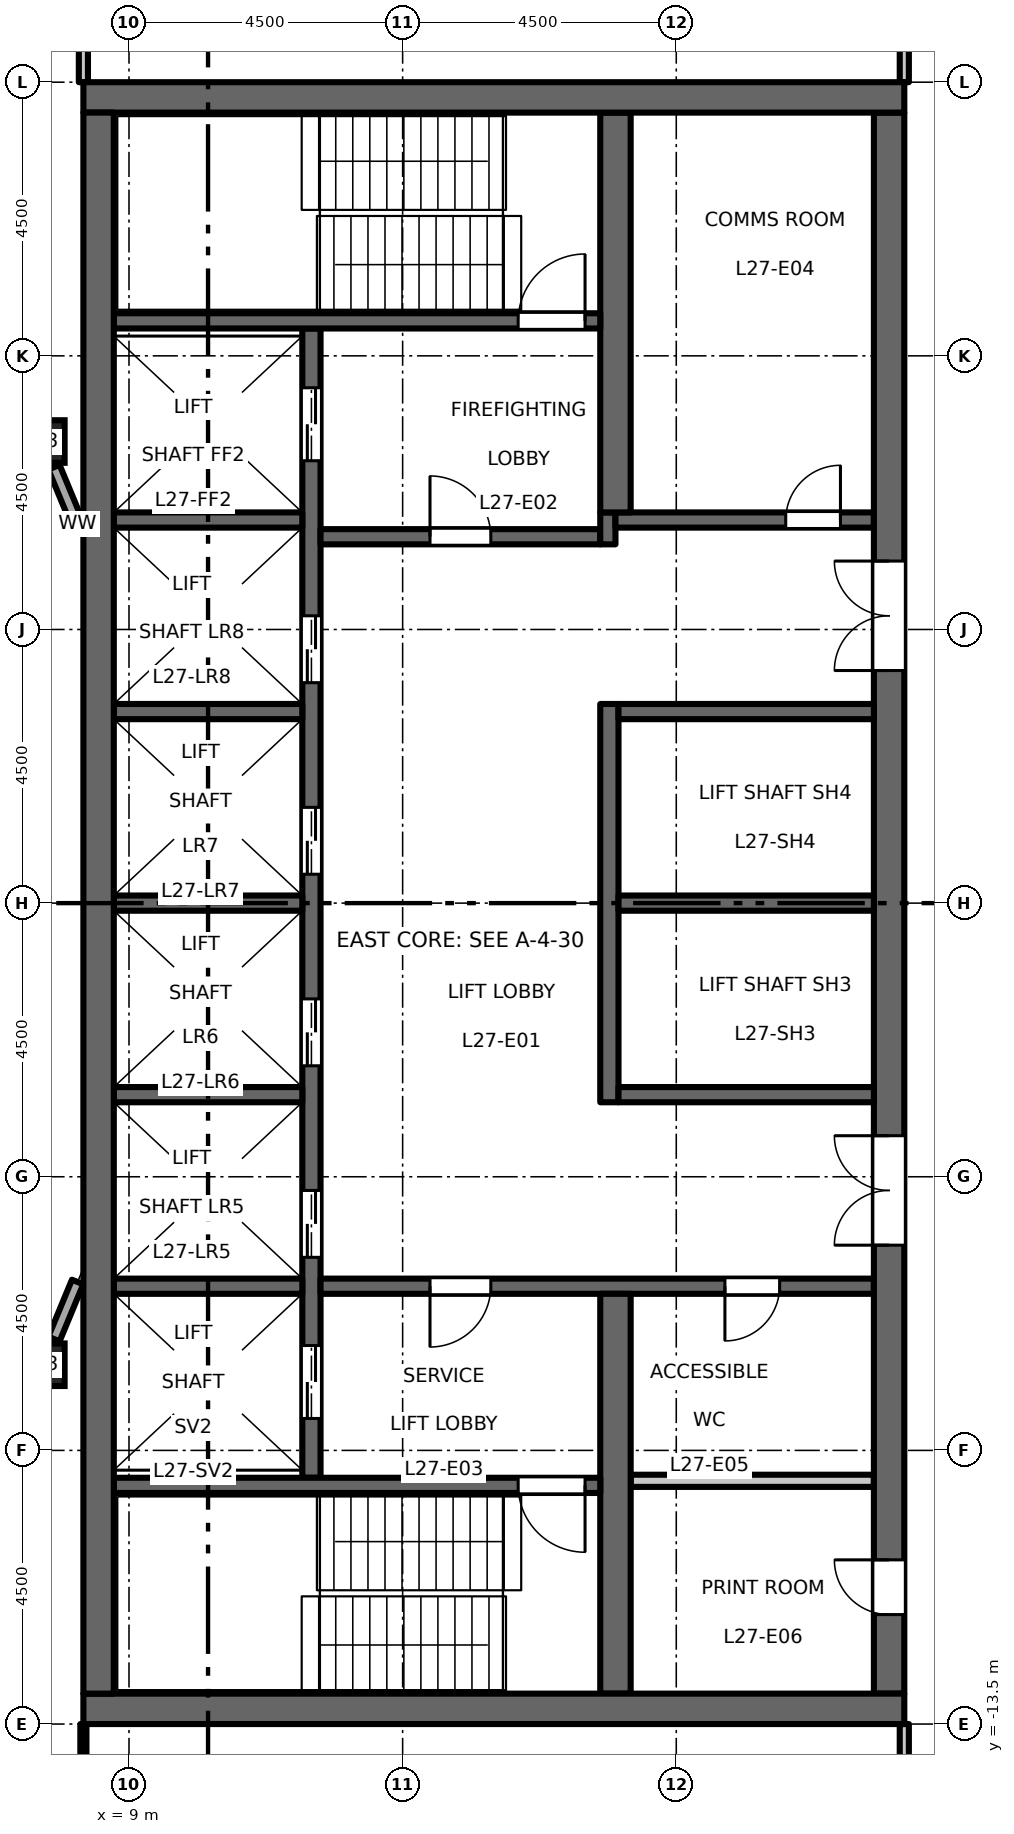
"""IFC4 building model, lengths in metres.
Left out: names, types, materials, properties, quantities, classifications, styles, units other than length and angle.
Written with IfcOpenShell. Run it as: python <this file> out.ifc"""

import sys

from ifc_helpers import new_model, si_unit, direction, frame, frame_2d, origin, origin_2d, place, context, subcontext, project, spatial, rectangle, hollow_rectangle, extrude, element, fill, save


model = new_model("IFC4")
c1 = context("Model", 3, precision=1e-05, world=origin(), true_north=direction((0.0, 1.0)))
c2 = subcontext(c1, "Body", "Model", "MODEL_VIEW")
j1 = project(units=[si_unit("LENGTHUNIT", "METRE"), si_unit("PLANEANGLEUNIT", "RADIAN")], contexts=[c1])
p1 = place(None, origin())
s1 = spatial("IfcSite", under=j1, at=p1, CompositionType="ELEMENT")
p2 = place(p1, origin())
s2 = spatial("IfcBuilding", under=s1, at=p2, CompositionType="ELEMENT")
p3 = place(p2, frame((0.0, 0.0, 127.2)))
s3 = spatial("IfcBuildingStorey", under=s2, at=p3, CompositionType="ELEMENT", Elevation=127.2)
for number, where, z_axis, x_axis in (
    (1, (7.591, -7.591, 0.0), (0.0, 0.0, 1.0), (1.0, 0.0, 0.0)),
    (2, (7.591, 7.591, 0.0), (0.0, 0.0, 1.0), (1.0, 0.0, 0.0)),
):
    element("IfcColumn", number, at=place(p3, frame(where, z_axis=z_axis, x_axis=x_axis)), inside=s3, PredefinedType="COLUMN", context=c2, shape_type="SweptSolid", body=[
        extrude(hollow_rectangle(XDim=0.7, YDim=0.7, WallThickness=0.04, at=origin_2d()), origin(), (0.0, 0.0, 1.0), 4.5),
    ])
p4 = place(p3, frame((12.0, -9.45, 0.0), z_axis=(0.0, 0.0, 1.0), x_axis=(0.0, 1.0, 0.0)))
e3 = element("IfcWall", 3, at=p4, inside=s3, PredefinedType="SHEAR", context=c2, shape_type="SweptSolid", body=[
    extrude(rectangle(XDim=18.9, YDim=0.3, at=frame_2d((9.45, 0.0))), origin(), (0.0, 0.0, 1.0), 4.35),
])
p5 = place(p4, frame((3.625, 0.0, 0.0)))
e4 = element("IfcOpeningElement", 4, at=p5, cuts=e3, PredefinedType="OPENING", context=c2, shape_type="SweptSolid", body=[
    extrude(rectangle(XDim=1.1, YDim=2.1, at=frame_2d((0.55, 1.05))), frame((0.0, 0.16, 0.0), z_axis=(0.0, -1.0, 0.0), x_axis=(1.0, 0.0, 0.0)), (0.0, 0.0, 1.0), 0.32),
])
p6 = place(p4, frame((6.775, 0.0, 0.0)))
e5 = element("IfcOpeningElement", 5, at=p6, cuts=e3, PredefinedType="OPENING", context=c2, shape_type="SweptSolid", body=[
    extrude(rectangle(XDim=1.1, YDim=2.1, at=frame_2d((0.55, 1.05))), frame((0.0, 0.16, 0.0), z_axis=(0.0, -1.0, 0.0), x_axis=(1.0, 0.0, 0.0)), (0.0, 0.0, 1.0), 0.32),
])
p7 = place(p4, frame((9.925, 0.0, 0.0)))
e6 = element("IfcOpeningElement", 6, at=p7, cuts=e3, PredefinedType="OPENING", context=c2, shape_type="SweptSolid", body=[
    extrude(rectangle(XDim=1.1, YDim=2.1, at=frame_2d((0.55, 1.05))), frame((0.0, 0.16, 0.0), z_axis=(0.0, -1.0, 0.0), x_axis=(1.0, 0.0, 0.0)), (0.0, 0.0, 1.0), 0.32),
])
p8 = place(p4, frame((13.075, 0.0, 0.0)))
e7 = element("IfcOpeningElement", 7, at=p8, cuts=e3, PredefinedType="OPENING", context=c2, shape_type="SweptSolid", body=[
    extrude(rectangle(XDim=1.1, YDim=2.1, at=frame_2d((0.55, 1.05))), frame((0.0, 0.16, 0.0), z_axis=(0.0, -1.0, 0.0), x_axis=(1.0, 0.0, 0.0)), (0.0, 0.0, 1.0), 0.32),
])
p9 = place(p4, frame((16.725, 0.0, 0.0)))
e8 = element("IfcOpeningElement", 8, at=p9, cuts=e3, PredefinedType="OPENING", context=c2, shape_type="SweptSolid", body=[
    extrude(rectangle(XDim=1.2, YDim=2.1, at=frame_2d((0.6, 1.05))), frame((0.0, 0.16, 0.0), z_axis=(0.0, -1.0, 0.0), x_axis=(1.0, 0.0, 0.0)), (0.0, 0.0, 1.0), 0.32),
])
p10 = place(p4, frame((0.975, 0.0, 0.0)))
e9 = element("IfcOpeningElement", 9, at=p10, cuts=e3, PredefinedType="OPENING", context=c2, shape_type="SweptSolid", body=[
    extrude(rectangle(XDim=1.2, YDim=2.1, at=frame_2d((0.6, 1.05))), frame((0.0, 0.16, 0.0), z_axis=(0.0, -1.0, 0.0), x_axis=(1.0, 0.0, 0.0)), (0.0, 0.0, 1.0), 0.32),
])
p11 = place(p3, frame((12.15, 6.025, 0.0), z_axis=(0.0, 0.0, 1.0), x_axis=(1.0, 0.0, 0.0)))
e10 = element("IfcWall", 10, at=p11, inside=s3, PredefinedType="SHEAR", context=c2, shape_type="SweptSolid", body=[
    extrude(rectangle(XDim=4.6, YDim=0.25, at=frame_2d((2.3, 0.0))), origin(), (0.0, 0.0, 1.0), 4.35),
])
p12 = place(p11, frame((1.8, 0.0, 0.0)))
e11 = element("IfcOpeningElement", 11, at=p12, cuts=e10, PredefinedType="OPENING", context=c2, shape_type="SweptSolid", body=[
    extrude(rectangle(XDim=1.0, YDim=2.1, at=frame_2d((0.5, 1.05))), frame((0.0, 0.135, 0.0), z_axis=(0.0, -1.0, 0.0), x_axis=(1.0, 0.0, 0.0)), (0.0, 0.0, 1.0), 0.27),
])
p13 = place(p3, frame((16.875, 5.9, 0.0), z_axis=(0.0, 0.0, 1.0), x_axis=(0.0, 1.0, 0.0)))
e12 = element("IfcWall", 12, at=p13, inside=s3, PredefinedType="SHEAR", context=c2, shape_type="SweptSolid", body=[
    extrude(rectangle(XDim=0.525, YDim=0.25, at=frame_2d((0.263, 0.0))), origin(), (0.0, 0.0, 1.0), 4.35),
])
p14 = place(p3, frame((17.0, 6.3, 0.0), z_axis=(0.0, 0.0, 1.0), x_axis=(1.0, 0.0, 0.0)))
e13 = element("IfcWall", 13, at=p14, inside=s3, PredefinedType="SHEAR", context=c2, shape_type="SweptSolid", body=[
    extrude(rectangle(XDim=4.25, YDim=0.25, at=frame_2d((2.125, 0.0))), origin(), (0.0, 0.0, 1.0), 4.35),
])
p15 = place(p14, frame((2.8, 0.0, 0.0)))
e14 = element("IfcOpeningElement", 14, at=p15, cuts=e13, PredefinedType="OPENING", context=c2, shape_type="SweptSolid", body=[
    extrude(rectangle(XDim=0.9, YDim=2.1, at=frame_2d((0.45, 1.05))), frame((0.0, 0.135, 0.0), z_axis=(0.0, -1.0, 0.0), x_axis=(1.0, 0.0, 0.0)), (0.0, 0.0, 1.0), 0.27),
])
p16 = place(p3, frame((12.15, -6.3, 0.0), z_axis=(0.0, 0.0, 1.0), x_axis=(1.0, 0.0, 0.0)))
e15 = element("IfcWall", 15, at=p16, inside=s3, PredefinedType="SHEAR", context=c2, shape_type="SweptSolid", body=[
    extrude(rectangle(XDim=9.1, YDim=0.25, at=frame_2d((4.55, 0.0))), origin(), (0.0, 0.0, 1.0), 4.35),
])
p17 = place(p16, frame((1.8, 0.0, 0.0)))
e16 = element("IfcOpeningElement", 16, at=p17, cuts=e15, PredefinedType="OPENING", context=c2, shape_type="SweptSolid", body=[
    extrude(rectangle(XDim=1.0, YDim=2.1, at=frame_2d((0.5, 1.05))), frame((0.0, 0.135, 0.0), z_axis=(0.0, -1.0, 0.0), x_axis=(1.0, 0.0, 0.0)), (0.0, 0.0, 1.0), 0.27),
])
p18 = place(p16, frame((6.65, 0.0, 0.0)))
e17 = element("IfcOpeningElement", 17, at=p18, cuts=e15, PredefinedType="OPENING", context=c2, shape_type="SweptSolid", body=[
    extrude(rectangle(XDim=0.9, YDim=2.1, at=frame_2d((0.45, 1.05))), frame((0.0, 0.135, 0.0), z_axis=(0.0, -1.0, 0.0), x_axis=(1.0, 0.0, 0.0)), (0.0, 0.0, 1.0), 0.27),
])
p19 = place(p3, frame((21.5, -13.0, 0.0), z_axis=(0.0, 0.0, 1.0), x_axis=(0.0, 1.0, 0.0)))
e18 = element("IfcWall", 18, at=p19, inside=s3, PredefinedType="SHEAR", context=c2, shape_type="SweptSolid", body=[
    extrude(rectangle(XDim=26.0, YDim=0.5, at=frame_2d((13.0, 0.0))), origin(), (0.0, 0.0, 1.0), 4.35),
])
p20 = place(p19, frame((16.825, 0.0, 0.0)))
e19 = element("IfcOpeningElement", 19, at=p20, cuts=e18, PredefinedType="OPENING", context=c2, shape_type="SweptSolid", body=[
    extrude(rectangle(XDim=1.8, YDim=2.1, at=frame_2d((0.9, 1.05))), frame((0.0, 0.26, 0.0), z_axis=(0.0, -1.0, 0.0), x_axis=(1.0, 0.0, 0.0)), (0.0, 0.0, 1.0), 0.52),
])
p21 = place(p19, frame((7.375, 0.0, 0.0)))
e20 = element("IfcOpeningElement", 20, at=p21, cuts=e18, PredefinedType="OPENING", context=c2, shape_type="SweptSolid", body=[
    extrude(rectangle(XDim=1.8, YDim=2.1, at=frame_2d((0.9, 1.05))), frame((0.0, 0.26, 0.0), z_axis=(0.0, -1.0, 0.0), x_axis=(1.0, 0.0, 0.0)), (0.0, 0.0, 1.0), 0.52),
])
p22 = place(p19, frame((1.3, 0.0, 0.0)))
e21 = element("IfcOpeningElement", 21, at=p22, cuts=e18, PredefinedType="OPENING", context=c2, shape_type="SweptSolid", body=[
    extrude(rectangle(XDim=0.9, YDim=2.1, at=frame_2d((0.45, 1.05))), frame((0.0, 0.26, 0.0), z_axis=(0.0, -1.0, 0.0), x_axis=(1.0, 0.0, 0.0)), (0.0, 0.0, 1.0), 0.52),
])
p23 = place(p3, frame((17.25, -9.5, 0.0), z_axis=(0.0, 0.0, 1.0), x_axis=(1.0, 0.0, 0.0)))
e22 = element("IfcWall", 22, at=p23, inside=s3, PredefinedType="PARTITIONING", context=c2, shape_type="SweptSolid", body=[
    extrude(rectangle(XDim=4.0, YDim=0.2, at=frame_2d((2.0, 0.0))), origin(), (0.0, 0.0, 1.0), 4.35),
])
p24 = place(p3, frame((16.9, -3.275, 0.0), z_axis=(0.0, 0.0, 1.0), x_axis=(0.0, 1.0, 0.0)))
e23 = element("IfcWall", 23, at=p24, inside=s3, PredefinedType="SHEAR", context=c2, shape_type="SweptSolid", body=[
    extrude(rectangle(XDim=6.55, YDim=0.3, at=frame_2d((3.275, 0.0))), origin(), (0.0, 0.0, 1.0), 4.35),
])
for number, where, z_axis, x_axis in (
    (24, (17.05, 0.0, 0.0), (0.0, 0.0, 1.0), (1.0, 0.0, 0.0)),
    (25, (17.05, 3.15, 0.0), (0.0, 0.0, 1.0), (1.0, 0.0, 0.0)),
    (26, (17.05, -3.15, 0.0), (0.0, 0.0, 1.0), (1.0, 0.0, 0.0)),
):
    element("IfcWall", number, at=place(p3, frame(where, z_axis=z_axis, x_axis=x_axis)), inside=s3, PredefinedType="SHEAR", context=c2, shape_type="SweptSolid", body=[
        extrude(rectangle(XDim=4.2, YDim=0.25, at=frame_2d((2.1, 0.0))), origin(), (0.0, 0.0, 1.0), 4.35),
    ])
for number, where, z_axis, x_axis in (
    (27, (17.0, 6.425, 0.0), (0.0, 0.0, 1.0), (0.0, 1.0, 0.0)),
    (28, (17.0, -13.0, 0.0), (0.0, 0.0, 1.0), (0.0, 1.0, 0.0)),
):
    element("IfcWall", number, at=place(p3, frame(where, z_axis=z_axis, x_axis=x_axis)), inside=s3, PredefinedType="SHEAR", context=c2, shape_type="SweptSolid", body=[
        extrude(rectangle(XDim=6.575, YDim=0.5, at=frame_2d((3.288, 0.0))), origin(), (0.0, 0.0, 1.0), 4.35),
    ])
for number, where, z_axis, x_axis in (
    (29, (8.75, 0.0, 0.0), (0.0, 0.0, 1.0), (1.0, 0.0, 0.0)),
    (30, (8.75, 3.15, 0.0), (0.0, 0.0, 1.0), (1.0, 0.0, 0.0)),
    (31, (8.75, 6.3, 0.0), (0.0, 0.0, 1.0), (1.0, 0.0, 0.0)),
    (32, (8.75, -3.15, 0.0), (0.0, 0.0, 1.0), (1.0, 0.0, 0.0)),
    (33, (8.75, -6.3, 0.0), (0.0, 0.0, 1.0), (1.0, 0.0, 0.0)),
):
    element("IfcWall", number, at=place(p3, frame(where, z_axis=z_axis, x_axis=x_axis)), inside=s3, PredefinedType="SHEAR", context=c2, shape_type="SweptSolid", body=[
        extrude(rectangle(XDim=3.1, YDim=0.25, at=frame_2d((1.55, 0.0))), origin(), (0.0, 0.0, 1.0), 4.35),
    ])
p25 = place(p3, frame((8.75, 9.575, 0.0), z_axis=(0.0, 0.0, 1.0), x_axis=(1.0, 0.0, 0.0)))
e34 = element("IfcWall", 34, at=p25, inside=s3, PredefinedType="SHEAR", context=c2, shape_type="SweptSolid", body=[
    extrude(rectangle(XDim=8.0, YDim=0.25, at=frame_2d((4.0, 0.0))), origin(), (0.0, 0.0, 1.0), 4.35),
])
p26 = place(p25, frame((6.65, 0.0, 0.0)))
e35 = element("IfcOpeningElement", 35, at=p26, cuts=e34, PredefinedType="OPENING", context=c2, shape_type="SweptSolid", body=[
    extrude(rectangle(XDim=1.1, YDim=2.1, at=frame_2d((0.55, 1.05))), frame((0.0, 0.135, 0.0), z_axis=(0.0, -1.0, 0.0), x_axis=(1.0, 0.0, 0.0)), (0.0, 0.0, 1.0), 0.27),
])
p27 = place(p3, frame((8.75, -9.575, 0.0), z_axis=(0.0, 0.0, 1.0), x_axis=(1.0, 0.0, 0.0)))
e36 = element("IfcWall", 36, at=p27, inside=s3, PredefinedType="SHEAR", context=c2, shape_type="SweptSolid", body=[
    extrude(rectangle(XDim=8.0, YDim=0.25, at=frame_2d((4.0, 0.0))), origin(), (0.0, 0.0, 1.0), 4.35),
])
p28 = place(p27, frame((6.65, 0.0, 0.0)))
e37 = element("IfcOpeningElement", 37, at=p28, cuts=e36, PredefinedType="OPENING", context=c2, shape_type="SweptSolid", body=[
    extrude(rectangle(XDim=1.1, YDim=2.1, at=frame_2d((0.55, 1.05))), frame((0.0, 0.135, 0.0), z_axis=(0.0, -1.0, 0.0), x_axis=(1.0, 0.0, 0.0)), (0.0, 0.0, 1.0), 0.27),
])
for number, where, z_axis, x_axis in (
    (38, (8.25, 13.25, 0.0), (0.0, 0.0, 1.0), (1.0, 0.0, 0.0)),
    (39, (8.25, -13.25, 0.0), (0.0, 0.0, 1.0), (1.0, 0.0, 0.0)),
):
    element("IfcWall", number, at=place(p3, frame(where, z_axis=z_axis, x_axis=x_axis)), inside=s3, PredefinedType="SHEAR", context=c2, shape_type="SweptSolid", body=[
        extrude(rectangle(XDim=13.5, YDim=0.5, at=frame_2d((6.75, 0.0))), origin(), (0.0, 0.0, 1.0), 4.35),
    ])
p29 = place(p3, frame((8.5, -13.0, 0.0), z_axis=(0.0, 0.0, 1.0), x_axis=(0.0, 1.0, 0.0)))
e40 = element("IfcWall", 40, at=p29, inside=s3, PredefinedType="SHEAR", context=c2, shape_type="SweptSolid", body=[
    extrude(rectangle(XDim=26.0, YDim=0.5, at=frame_2d((13.0, 0.0))), origin(), (0.0, 0.0, 1.0), 4.35),
])
for number, where, z_axis, x_axis in (
    (41, (7.766, -7.168, 0.0), (0.0, 0.0, 1.0), (0.383, 0.924, 0.0)),
    (42, (8.154, 6.231, 0.0), (0.0, 0.0, 1.0), (-0.383, 0.924, 0.0)),
):
    element("IfcWall", number, at=place(p3, frame(where, z_axis=z_axis, x_axis=x_axis)), inside=s3, PredefinedType="STANDARD", context=c2, shape_type="SweptSolid", body=[
        extrude(rectangle(XDim=1.015, YDim=0.2, at=frame_2d((0.507, 0.0))), origin(), (0.0, 0.0, 1.0), 3.826),
    ])
p30 = place(p3, frame((8.25, -17.925, 0.0), z_axis=(0.0, 0.0, 1.0), x_axis=(0.0, 1.0, 0.0)))
e43 = element("IfcWall", 43, at=p30, inside=s3, PredefinedType="PARTITIONING", context=c2, shape_type="SweptSolid", body=[
    extrude(rectangle(XDim=4.425, YDim=0.1, at=frame_2d((2.212, 0.0))), origin(), (0.0, 0.0, 1.0), 4.35),
])
p31 = place(p3, frame((8.25, 13.5, 0.0), z_axis=(0.0, 0.0, 1.0), x_axis=(0.0, 1.0, 0.0)))
e44 = element("IfcWall", 44, at=p31, inside=s3, PredefinedType="PARTITIONING", context=c2, shape_type="SweptSolid", body=[
    extrude(rectangle(XDim=2.3, YDim=0.15, at=frame_2d((1.15, 0.0))), origin(), (0.0, 0.0, 1.0), 4.35),
])
for number, where, z_axis, x_axis in (
    (45, (21.75, -17.925, 0.0), (0.0, 0.0, 1.0), (0.0, 1.0, 0.0)),
    (46, (21.75, 13.5, 0.0), (0.0, 0.0, 1.0), (0.0, 1.0, 0.0)),
):
    element("IfcWall", number, at=place(p3, frame(where, z_axis=z_axis, x_axis=x_axis)), inside=s3, PredefinedType="PARTITIONING", context=c2, shape_type="SweptSolid", body=[
        extrude(rectangle(XDim=4.425, YDim=0.15, at=frame_2d((2.212, 0.0))), origin(), (0.0, 0.0, 1.0), 4.35),
    ])
p32 = place(p12, origin())
e47 = element("IfcDoor", 47, at=p32, inside=s3, OperationType="SINGLE_SWING_RIGHT", PredefinedType="DOOR", context=c2, shape_type="SweptSolid", body=[
    extrude(rectangle(XDim=1.0, YDim=2.1, at=frame_2d((0.5, 1.05))), frame((0.0, 0.025, 0.0), z_axis=(0.0, -1.0, 0.0), x_axis=(1.0, 0.0, 0.0)), (0.0, 0.0, 1.0), 0.05),
])
fill(e11, e47)
p33 = place(p17, origin())
e48 = element("IfcDoor", 48, at=p33, inside=s3, OperationType="SINGLE_SWING_LEFT", PredefinedType="DOOR", context=c2, shape_type="SweptSolid", body=[
    extrude(rectangle(XDim=1.0, YDim=2.1, at=frame_2d((0.5, 1.05))), frame((0.0, 0.025, 0.0), z_axis=(0.0, -1.0, 0.0), x_axis=(1.0, 0.0, 0.0)), (0.0, 0.0, 1.0), 0.05),
])
fill(e16, e48)
p34 = place(p26, origin())
e49 = element("IfcDoor", 49, at=p34, inside=s3, OperationType="SINGLE_SWING_LEFT", PredefinedType="DOOR", context=c2, shape_type="SweptSolid", body=[
    extrude(rectangle(XDim=1.1, YDim=2.1, at=frame_2d((0.55, 1.05))), frame((0.0, 0.025, 0.0), z_axis=(0.0, -1.0, 0.0), x_axis=(1.0, 0.0, 0.0)), (0.0, 0.0, 1.0), 0.05),
])
fill(e35, e49)
p35 = place(p28, origin())
e50 = element("IfcDoor", 50, at=p35, inside=s3, OperationType="SINGLE_SWING_RIGHT", PredefinedType="DOOR", context=c2, shape_type="SweptSolid", body=[
    extrude(rectangle(XDim=1.1, YDim=2.1, at=frame_2d((0.55, 1.05))), frame((0.0, 0.025, 0.0), z_axis=(0.0, -1.0, 0.0), x_axis=(1.0, 0.0, 0.0)), (0.0, 0.0, 1.0), 0.05),
])
fill(e37, e50)
p36 = place(p20, origin())
e51 = element("IfcDoor", 51, at=p36, inside=s3, OperationType="DOUBLE_DOOR_DOUBLE_SWING", PredefinedType="DOOR", context=c2, shape_type="SweptSolid", body=[
    extrude(rectangle(XDim=1.8, YDim=2.1, at=frame_2d((0.9, 1.05))), frame((0.0, 0.025, 0.0), z_axis=(0.0, -1.0, 0.0), x_axis=(1.0, 0.0, 0.0)), (0.0, 0.0, 1.0), 0.05),
])
fill(e19, e51)
p37 = place(p21, origin())
e52 = element("IfcDoor", 52, at=p37, inside=s3, OperationType="DOUBLE_DOOR_DOUBLE_SWING", PredefinedType="DOOR", context=c2, shape_type="SweptSolid", body=[
    extrude(rectangle(XDim=1.8, YDim=2.1, at=frame_2d((0.9, 1.05))), frame((0.0, 0.025, 0.0), z_axis=(0.0, -1.0, 0.0), x_axis=(1.0, 0.0, 0.0)), (0.0, 0.0, 1.0), 0.05),
])
fill(e20, e52)
p38 = place(p5, origin())
e53 = element("IfcDoor", 53, at=p38, inside=s3, OperationType="DOUBLE_DOOR_SLIDING", PredefinedType="DOOR", context=c2, shape_type="SweptSolid", body=[
    extrude(rectangle(XDim=1.1, YDim=2.1, at=frame_2d((0.55, 1.05))), frame((0.0, 0.025, 0.0), z_axis=(0.0, -1.0, 0.0), x_axis=(1.0, 0.0, 0.0)), (0.0, 0.0, 1.0), 0.05),
])
fill(e4, e53)
p39 = place(p6, origin())
e54 = element("IfcDoor", 54, at=p39, inside=s3, OperationType="DOUBLE_DOOR_SLIDING", PredefinedType="DOOR", context=c2, shape_type="SweptSolid", body=[
    extrude(rectangle(XDim=1.1, YDim=2.1, at=frame_2d((0.55, 1.05))), frame((0.0, 0.025, 0.0), z_axis=(0.0, -1.0, 0.0), x_axis=(1.0, 0.0, 0.0)), (0.0, 0.0, 1.0), 0.05),
])
fill(e5, e54)
p40 = place(p7, origin())
e55 = element("IfcDoor", 55, at=p40, inside=s3, OperationType="DOUBLE_DOOR_SLIDING", PredefinedType="DOOR", context=c2, shape_type="SweptSolid", body=[
    extrude(rectangle(XDim=1.1, YDim=2.1, at=frame_2d((0.55, 1.05))), frame((0.0, 0.025, 0.0), z_axis=(0.0, -1.0, 0.0), x_axis=(1.0, 0.0, 0.0)), (0.0, 0.0, 1.0), 0.05),
])
fill(e6, e55)
p41 = place(p8, origin())
e56 = element("IfcDoor", 56, at=p41, inside=s3, OperationType="DOUBLE_DOOR_SLIDING", PredefinedType="DOOR", context=c2, shape_type="SweptSolid", body=[
    extrude(rectangle(XDim=1.1, YDim=2.1, at=frame_2d((0.55, 1.05))), frame((0.0, 0.025, 0.0), z_axis=(0.0, -1.0, 0.0), x_axis=(1.0, 0.0, 0.0)), (0.0, 0.0, 1.0), 0.05),
])
fill(e7, e56)
p42 = place(p9, origin())
e57 = element("IfcDoor", 57, at=p42, inside=s3, OperationType="DOUBLE_DOOR_SLIDING", PredefinedType="DOOR", context=c2, shape_type="SweptSolid", body=[
    extrude(rectangle(XDim=1.2, YDim=2.1, at=frame_2d((0.6, 1.05))), frame((0.0, 0.025, 0.0), z_axis=(0.0, -1.0, 0.0), x_axis=(1.0, 0.0, 0.0)), (0.0, 0.0, 1.0), 0.05),
])
fill(e8, e57)
p43 = place(p10, origin())
e58 = element("IfcDoor", 58, at=p43, inside=s3, OperationType="DOUBLE_DOOR_SLIDING", PredefinedType="DOOR", context=c2, shape_type="SweptSolid", body=[
    extrude(rectangle(XDim=1.2, YDim=2.1, at=frame_2d((0.6, 1.05))), frame((0.0, 0.025, 0.0), z_axis=(0.0, -1.0, 0.0), x_axis=(1.0, 0.0, 0.0)), (0.0, 0.0, 1.0), 0.05),
])
fill(e9, e58)
p44 = place(p15, origin())
e59 = element("IfcDoor", 59, at=p44, inside=s3, OperationType="SINGLE_SWING_LEFT", PredefinedType="DOOR", context=c2, shape_type="SweptSolid", body=[
    extrude(rectangle(XDim=0.9, YDim=2.1, at=frame_2d((0.45, 1.05))), frame((0.0, 0.025, 0.0), z_axis=(0.0, -1.0, 0.0), x_axis=(1.0, 0.0, 0.0)), (0.0, 0.0, 1.0), 0.05),
])
fill(e14, e59)
p45 = place(p18, origin())
e60 = element("IfcDoor", 60, at=p45, inside=s3, OperationType="SINGLE_SWING_LEFT", PredefinedType="DOOR", context=c2, shape_type="SweptSolid", body=[
    extrude(rectangle(XDim=0.9, YDim=2.1, at=frame_2d((0.45, 1.05))), frame((0.0, 0.025, 0.0), z_axis=(0.0, -1.0, 0.0), x_axis=(1.0, 0.0, 0.0)), (0.0, 0.0, 1.0), 0.05),
])
fill(e17, e60)
p46 = place(p22, origin())
e61 = element("IfcDoor", 61, at=p46, inside=s3, OperationType="SINGLE_SWING_LEFT", PredefinedType="DOOR", context=c2, shape_type="SweptSolid", body=[
    extrude(rectangle(XDim=0.9, YDim=2.1, at=frame_2d((0.45, 1.05))), frame((0.0, 0.025, 0.0), z_axis=(0.0, -1.0, 0.0), x_axis=(1.0, 0.0, 0.0)), (0.0, 0.0, 1.0), 0.05),
])
fill(e21, e61)
save(model, sys.argv[1])
